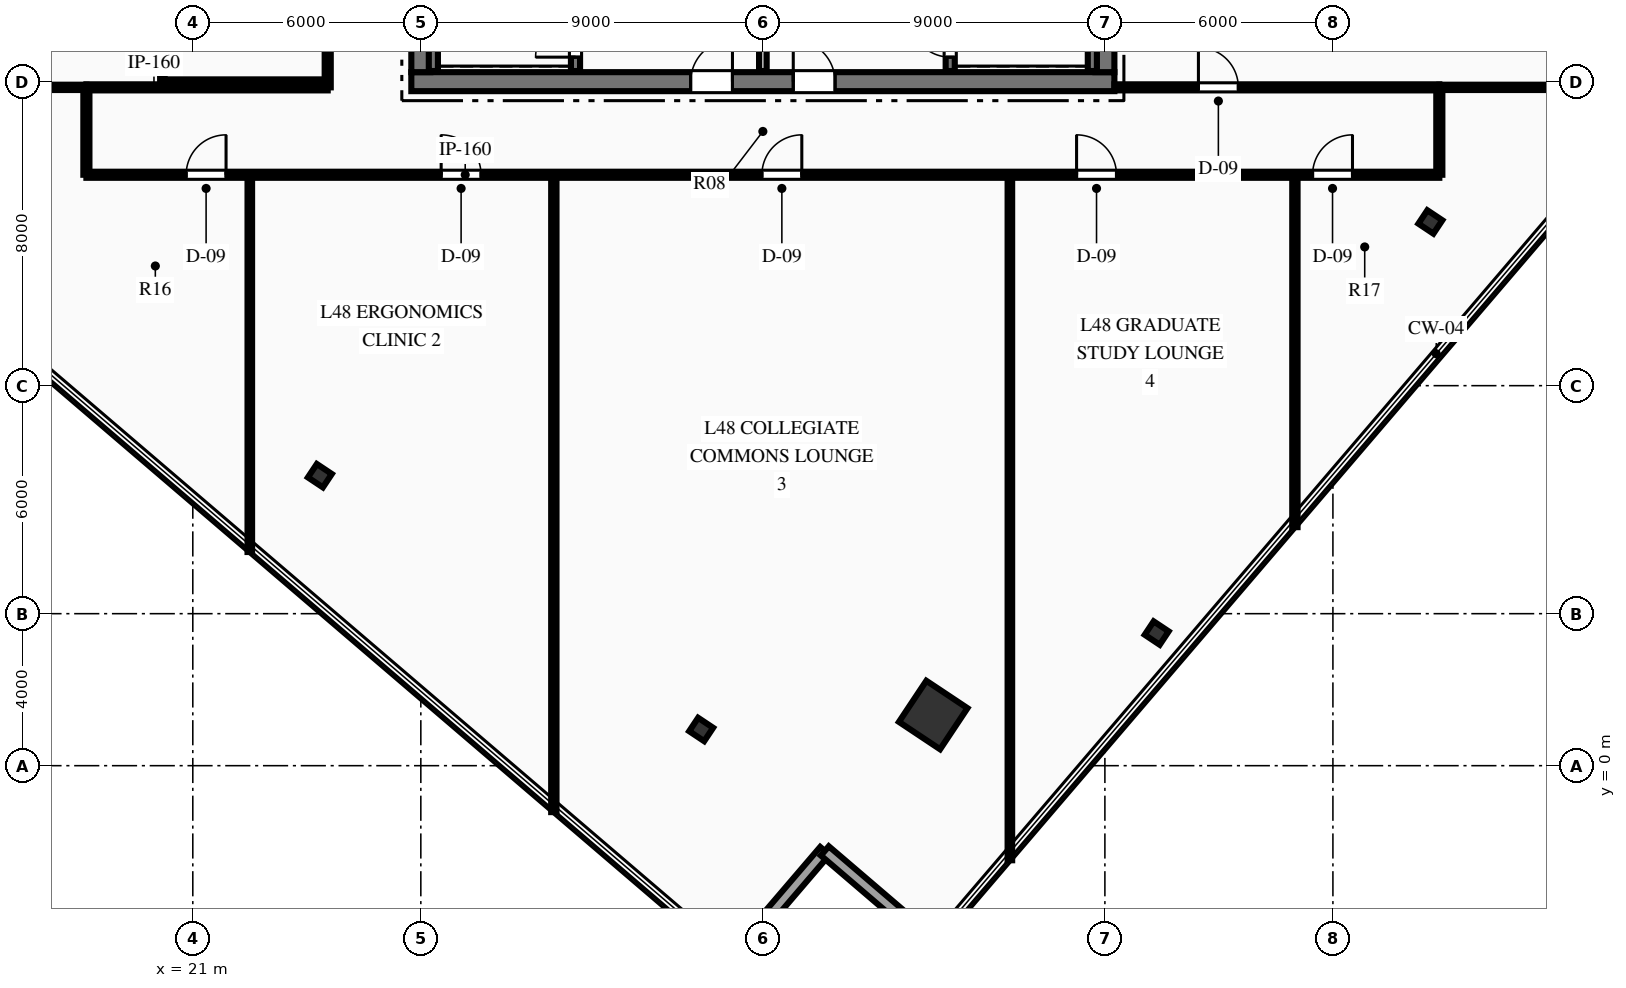
"""IFC4 building model, lengths in metres.
Left out: names, types, materials, properties, quantities, classifications, styles, units other than length and angle.
Written with IfcOpenShell. Run it as: python <this file> out.ifc"""

import sys

from ifc_helpers import new_model, si_unit, direction, frame, frame_2d, origin, origin_2d, place, context, subcontext, project, spatial, rectangle, hollow_rectangle, i_section, extrude, element, fill, save


model = new_model("IFC4")
c1 = context("Model", 3, precision=1e-05, world=origin(), true_north=direction((0.0, 1.0)))
c2 = subcontext(c1, "Body", "Model", "MODEL_VIEW")
j1 = project(units=[si_unit("LENGTHUNIT", "METRE"), si_unit("PLANEANGLEUNIT", "RADIAN")], contexts=[c1])
p1 = place(None, origin())
s1 = spatial("IfcSite", under=j1, at=p1, CompositionType="ELEMENT")
p2 = place(p1, origin())
s2 = spatial("IfcBuilding", under=s1, at=p2, CompositionType="ELEMENT")
p3 = place(p2, frame((0.0, 0.0, 193.95)))
s3 = spatial("IfcBuildingStorey", under=s2, at=p3, CompositionType="ELEMENT", Elevation=193.95)
p4 = place(p3, frame((26.75, 18.0, 0.0), z_axis=(0.0, 0.0, 1.0), x_axis=(1.0, 0.0, 0.0)))
e1 = element("IfcWall", 1, at=p4, inside=s3, PredefinedType="SHEAR", context=c2, shape_type="SweptSolid", body=[
    extrude(rectangle(XDim=18.5, YDim=0.5, at=frame_2d((9.25, 0.0))), origin(), (0.0, 0.0, 1.0), 4.5),
])
p5 = place(p4, frame((7.35, 0.0, 0.0)))
e2 = element("IfcOpeningElement", 2, at=p5, cuts=e1, PredefinedType="OPENING", context=c2, shape_type="SweptSolid", body=[
    extrude(rectangle(XDim=1.1, YDim=2.15, at=frame_2d((0.55, 1.075))), frame((0.0, 0.26, 0.0), z_axis=(0.0, -1.0, 0.0), x_axis=(1.0, 0.0, 0.0)), (0.0, 0.0, 1.0), 0.52),
])
p6 = place(p4, frame((10.05, 0.0, 0.0)))
e3 = element("IfcOpeningElement", 3, at=p6, cuts=e1, PredefinedType="OPENING", context=c2, shape_type="SweptSolid", body=[
    extrude(rectangle(XDim=1.1, YDim=2.15, at=frame_2d((0.55, 1.075))), frame((0.0, 0.26, 0.0), z_axis=(0.0, -1.0, 0.0), x_axis=(1.0, 0.0, 0.0)), (0.0, 0.0, 1.0), 0.52),
])
p7 = place(p3, frame((27.0, 18.25, 0.0), z_axis=(0.0, 0.0, 1.0), x_axis=(0.0, 1.0, 0.0)))
e4 = element("IfcWall", 4, at=p7, inside=s3, PredefinedType="SHEAR", context=c2, shape_type="SweptSolid", body=[
    extrude(rectangle(XDim=15.5, YDim=0.5, at=frame_2d((7.75, 0.0))), origin(), (0.0, 0.0, 1.0), 4.5),
])
p8 = place(p7, frame((9.99, 0.0, 0.0)))
e5 = element("IfcOpeningElement", 5, at=p8, cuts=e4, PredefinedType="OPENING", context=c2, shape_type="SweptSolid", body=[
    extrude(rectangle(XDim=1.4, YDim=2.2, at=frame_2d((0.7, 1.1))), frame((0.0, 0.26, 0.0), z_axis=(0.0, -1.0, 0.0), x_axis=(1.0, 0.0, 0.0)), (0.0, 0.0, 1.0), 0.52),
])
p9 = place(p3, frame((45.0, 18.25, 0.0), z_axis=(0.0, 0.0, 1.0), x_axis=(0.0, 1.0, 0.0)))
e6 = element("IfcWall", 6, at=p9, inside=s3, PredefinedType="SHEAR", context=c2, shape_type="SweptSolid", body=[
    extrude(rectangle(XDim=15.5, YDim=0.5, at=frame_2d((7.75, 0.0))), origin(), (0.0, 0.0, 1.0), 4.5),
])
p10 = place(p9, frame((9.99, 0.0, 0.0)))
e7 = element("IfcOpeningElement", 7, at=p10, cuts=e6, PredefinedType="OPENING", context=c2, shape_type="SweptSolid", body=[
    extrude(rectangle(XDim=1.4, YDim=2.2, at=frame_2d((0.7, 1.1))), frame((0.0, 0.26, 0.0), z_axis=(0.0, -1.0, 0.0), x_axis=(1.0, 0.0, 0.0)), (0.0, 0.0, 1.0), 0.52),
])
p11 = place(p3, frame((31.07, 18.28, 0.0), z_axis=(0.0, 0.0, 1.0), x_axis=(0.0, 1.0, 0.0)))
e8 = element("IfcWall", 8, at=p11, inside=s3, PredefinedType="SHEAR", context=c2, shape_type="SweptSolid", body=[
    extrude(rectangle(XDim=8.26, YDim=0.24, at=frame_2d((4.13, 0.0))), origin(), (0.0, 0.0, 1.0), 4.5),
])
p12 = place(p11, frame((0.365, 0.0, 0.0)))
e9 = element("IfcOpeningElement", 9, at=p12, cuts=e8, PredefinedType="OPENING", context=c2, shape_type="SweptSolid", body=[
    extrude(rectangle(XDim=1.05, YDim=2.15, at=frame_2d((0.525, 1.075))), frame((0.0, 0.13, 0.0), z_axis=(0.0, -1.0, 0.0), x_axis=(1.0, 0.0, 0.0)), (0.0, 0.0, 1.0), 0.26),
])
p13 = place(p3, frame((27.33, 18.28, 0.0), z_axis=(0.0, 0.0, 1.0), x_axis=(0.0, 1.0, 0.0)))
e10 = element("IfcWall", 10, at=p13, inside=s3, PredefinedType="SHEAR", context=c2, shape_type="SweptSolid", body=[
    extrude(rectangle(XDim=8.26, YDim=0.24, at=frame_2d((4.13, 0.0))), origin(), (0.0, 0.0, 1.0), 4.5),
])
p14 = place(p3, frame((40.93, 18.28, 0.0), z_axis=(0.0, 0.0, 1.0), x_axis=(0.0, 1.0, 0.0)))
e11 = element("IfcWall", 11, at=p14, inside=s3, PredefinedType="SHEAR", context=c2, shape_type="SweptSolid", body=[
    extrude(rectangle(XDim=8.26, YDim=0.24, at=frame_2d((4.13, 0.0))), origin(), (0.0, 0.0, 1.0), 4.5),
])
p15 = place(p14, frame((0.365, 0.0, 0.0)))
e12 = element("IfcOpeningElement", 12, at=p15, cuts=e11, PredefinedType="OPENING", context=c2, shape_type="SweptSolid", body=[
    extrude(rectangle(XDim=1.05, YDim=2.15, at=frame_2d((0.525, 1.075))), frame((0.0, 0.13, 0.0), z_axis=(0.0, -1.0, 0.0), x_axis=(1.0, 0.0, 0.0)), (0.0, 0.0, 1.0), 0.26),
])
p16 = place(p3, frame((44.67, 18.28, 0.0), z_axis=(0.0, 0.0, 1.0), x_axis=(0.0, 1.0, 0.0)))
e13 = element("IfcWall", 13, at=p16, inside=s3, PredefinedType="SHEAR", context=c2, shape_type="SweptSolid", body=[
    extrude(rectangle(XDim=8.26, YDim=0.24, at=frame_2d((4.13, 0.0))), origin(), (0.0, 0.0, 1.0), 4.5),
])
p17 = place(p3, frame((40.483, 1.333, 0.0), z_axis=(0.0, 0.0, 1.0), x_axis=(0.554118199338, 0.832437998389, 0.0)))
e14 = element("IfcColumn", 14, at=p17, inside=s3, PredefinedType="COLUMN", context=c2, shape_type="SweptSolid", body=[
    extrude(hollow_rectangle(XDim=1.3, YDim=1.3, WallThickness=0.06, at=origin_2d()), origin(), (0.0, 0.0, 1.0), 4.5),
])
for number, where, z_axis, x_axis in (
    (15, (46.363, 3.49, 0.0), (0.0, 0.0, 1.0), (0.554, 0.832, 0.0)),
    (16, (53.564, 14.308, 0.0), (0.0, 0.0, 1.0), (0.554, 0.832, 0.0)),
    (17, (24.343, 7.631, 0.0), (0.0, 0.0, 1.0), (0.554, 0.832, 0.0)),
    (18, (34.377, 0.952, 0.0), (0.0, 0.0, 1.0), (0.554, 0.832, 0.0)),
):
    element("IfcColumn", number, at=place(p3, frame(where, z_axis=z_axis, x_axis=x_axis)), inside=s3, PredefinedType="COLUMN", context=c2, shape_type="SweptSolid", body=[
        extrude(i_section(OverallWidth=0.424, OverallDepth=0.474, WebThickness=0.048, FlangeThickness=0.077, at=origin_2d()), origin(), (0.0, 0.0, 1.0), 4.5),
    ])
for number, where, z_axis, x_axis in (
    (19, (37.631, -2.243, 0.0), (0.0, 0.0, 1.0), (-0.65, -0.76, 0.0)),
    (20, (40.594, -4.778, 0.0), (0.0, 0.0, 1.0), (-0.76, 0.65, 0.0)),
):
    element("IfcWall", number, at=place(p3, frame(where, z_axis=z_axis, x_axis=x_axis)), inside=s3, PredefinedType="STANDARD", context=c2, shape_type="SweptSolid", body=[
        extrude(rectangle(XDim=3.9, YDim=0.32, at=frame_2d((1.95, 0.0))), origin(), (0.0, 0.0, 1.0), 4.22),
    ])
p18 = place(p3, frame((36.0, 18.28, 0.0), z_axis=(0.0, 0.0, 1.0), x_axis=(0.0, 1.0, 0.0)))
e21 = element("IfcWall", 21, at=p18, inside=s3, PredefinedType="PARTITIONING", context=c2, shape_type="SweptSolid", body=[
    extrude(rectangle(XDim=3.77, YDim=0.2, at=frame_2d((1.885, 0.0))), origin(), (0.0, 0.0, 1.0), 4.22),
])
p19 = place(p3, frame((18.2, 15.55, 0.0), z_axis=(0.0, 0.0, 1.0), x_axis=(1.0, 0.0, 0.0)))
e22 = element("IfcWall", 22, at=p19, inside=s3, PredefinedType="PARTITIONING", context=c2, shape_type="SweptSolid", body=[
    extrude(rectangle(XDim=35.6, YDim=0.16, at=frame_2d((17.8, 0.0))), origin(), (0.0, 0.0, 1.0), 3.599),
])
p20 = place(p19, frame((2.625, 0.0, 0.0)))
e23 = element("IfcOpeningElement", 23, at=p20, cuts=e22, PredefinedType="OPENING", context=c2, shape_type="SweptSolid", body=[
    extrude(rectangle(XDim=1.05, YDim=2.15, at=frame_2d((0.525, 1.075))), frame((0.0, 0.09, 0.0), z_axis=(0.0, -1.0, 0.0), x_axis=(1.0, 0.0, 0.0)), (0.0, 0.0, 1.0), 0.18),
])
p21 = place(p19, frame((9.335, 0.0, 0.0)))
e24 = element("IfcOpeningElement", 24, at=p21, cuts=e22, PredefinedType="OPENING", context=c2, shape_type="SweptSolid", body=[
    extrude(rectangle(XDim=1.05, YDim=2.15, at=frame_2d((0.525, 1.075))), frame((0.0, 0.09, 0.0), z_axis=(0.0, -1.0, 0.0), x_axis=(1.0, 0.0, 0.0)), (0.0, 0.0, 1.0), 0.18),
])
p22 = place(p19, frame((17.775, 0.0, 0.0)))
e25 = element("IfcOpeningElement", 25, at=p22, cuts=e22, PredefinedType="OPENING", context=c2, shape_type="SweptSolid", body=[
    extrude(rectangle(XDim=1.05, YDim=2.15, at=frame_2d((0.525, 1.075))), frame((0.0, 0.09, 0.0), z_axis=(0.0, -1.0, 0.0), x_axis=(1.0, 0.0, 0.0)), (0.0, 0.0, 1.0), 0.18),
])
p23 = place(p19, frame((26.055, 0.0, 0.0)))
e26 = element("IfcOpeningElement", 26, at=p23, cuts=e22, PredefinedType="OPENING", context=c2, shape_type="SweptSolid", body=[
    extrude(rectangle(XDim=1.05, YDim=2.15, at=frame_2d((0.525, 1.075))), frame((0.0, 0.09, 0.0), z_axis=(0.0, -1.0, 0.0), x_axis=(1.0, 0.0, 0.0)), (0.0, 0.0, 1.0), 0.18),
])
p24 = place(p19, frame((32.265, 0.0, 0.0)))
e27 = element("IfcOpeningElement", 27, at=p24, cuts=e22, PredefinedType="OPENING", context=c2, shape_type="SweptSolid", body=[
    extrude(rectangle(XDim=1.05, YDim=2.15, at=frame_2d((0.525, 1.075))), frame((0.0, 0.09, 0.0), z_axis=(0.0, -1.0, 0.0), x_axis=(1.0, 0.0, 0.0)), (0.0, 0.0, 1.0), 0.18),
])
p25 = place(p3, frame((18.2, 17.85, 0.0), z_axis=(0.0, 0.0, 1.0), x_axis=(1.0, 0.0, 0.0)))
e28 = element("IfcWall", 28, at=p25, inside=s3, PredefinedType="PARTITIONING", context=c2, shape_type="SweptSolid", body=[
    extrude(rectangle(XDim=6.35, YDim=0.16, at=frame_2d((3.175, 0.0))), origin(), (0.0, 0.0, 1.0), 4.22),
])
p26 = place(p3, frame((45.25, 17.85, 0.0), z_axis=(0.0, 0.0, 1.0), x_axis=(1.0, 0.0, 0.0)))
e29 = element("IfcWall", 29, at=p26, inside=s3, PredefinedType="PARTITIONING", context=c2, shape_type="SweptSolid", body=[
    extrude(rectangle(XDim=8.55, YDim=0.16, at=frame_2d((4.275, 0.0))), origin(), (0.0, 0.0, 1.0), 4.22),
])
p27 = place(p26, frame((2.211, 0.0, 0.0)))
e30 = element("IfcOpeningElement", 30, at=p27, cuts=e29, PredefinedType="OPENING", context=c2, shape_type="SweptSolid", body=[
    extrude(rectangle(XDim=1.05, YDim=2.15, at=frame_2d((0.525, 1.075))), frame((0.0, 0.09, 0.0), z_axis=(0.0, -1.0, 0.0), x_axis=(1.0, 0.0, 0.0)), (0.0, 0.0, 1.0), 0.18),
])
p28 = place(p3, frame((24.55, 17.85, 0.0), z_axis=(0.0, 0.0, 1.0), x_axis=(0.0, 1.0, 0.0)))
e31 = element("IfcWall", 31, at=p28, inside=s3, PredefinedType="PARTITIONING", context=c2, shape_type="SweptSolid", body=[
    extrude(rectangle(XDim=16.3, YDim=0.16, at=frame_2d((8.15, 0.0))), origin(), (0.0, 0.0, 1.0), 4.22),
])
p29 = place(p28, frame((2.775, 0.0, 0.0)))
e32 = element("IfcOpeningElement", 32, at=p29, cuts=e31, PredefinedType="OPENING", context=c2, shape_type="SweptSolid", body=[
    extrude(rectangle(XDim=0.95, YDim=2.15, at=frame_2d((0.475, 1.075))), frame((0.0, 0.09, 0.0), z_axis=(0.0, -1.0, 0.0), x_axis=(1.0, 0.0, 0.0)), (0.0, 0.0, 1.0), 0.18),
])
p30 = place(p28, frame((8.729, 0.0, 0.0)))
e33 = element("IfcOpeningElement", 33, at=p30, cuts=e31, PredefinedType="OPENING", context=c2, shape_type="SweptSolid", body=[
    extrude(rectangle(XDim=1.05, YDim=2.15, at=frame_2d((0.525, 1.075))), frame((0.0, 0.09, 0.0), z_axis=(0.0, -1.0, 0.0), x_axis=(1.0, 0.0, 0.0)), (0.0, 0.0, 1.0), 0.18),
])
for number, where, z_axis, x_axis in (
    (34, (18.2, 15.55, 0.0), (0.0, 0.0, 1.0), (0.0, 1.0, 0.0)),
    (35, (53.8, 15.55, 0.0), (0.0, 0.0, 1.0), (0.0, 1.0, 0.0)),
):
    element("IfcWall", number, at=place(p3, frame(where, z_axis=z_axis, x_axis=x_axis)), inside=s3, PredefinedType="PARTITIONING", context=c2, shape_type="SweptSolid", body=[
        extrude(rectangle(XDim=2.3, YDim=0.16, at=frame_2d((1.15, 0.0))), origin(), (0.0, 0.0, 1.0), 4.22),
    ])
p31 = place(p3, frame((8.209, 17.85, 0.0), z_axis=(0.0, 0.0, 1.0), x_axis=(1.0, 0.0, 0.0)))
e36 = element("IfcWall", 36, at=p31, inside=s3, PredefinedType="PARTITIONING", context=c2, shape_type="SweptSolid", body=[
    extrude(rectangle(XDim=9.991, YDim=0.14, at=frame_2d((4.996, 0.0))), origin(), (0.0, 0.0, 1.0), 4.22),
])
p32 = place(p3, frame((53.8, 17.85, 0.0), z_axis=(0.0, 0.0, 1.0), x_axis=(1.0, 0.0, 0.0)))
e37 = element("IfcWall", 37, at=p32, inside=s3, PredefinedType="PARTITIONING", context=c2, shape_type="SweptSolid", body=[
    extrude(rectangle(XDim=6.102, YDim=0.14, at=frame_2d((3.051, 0.0))), origin(), (0.0, 0.0, 1.0), 4.22),
])
p33 = place(p3, frame((22.5, 5.623, 0.0), z_axis=(0.0, 0.0, 1.0), x_axis=(0.0, 1.0, 0.0)))
e38 = element("IfcWall", 38, at=p33, inside=s3, PredefinedType="PARTITIONING", context=c2, shape_type="SweptSolid", body=[
    extrude(rectangle(XDim=9.927, YDim=0.12, at=frame_2d((4.964, 0.0))), origin(), (0.0, 0.0, 1.0), 4.22),
])
p34 = place(p3, frame((30.5, -1.222, 0.0), z_axis=(0.0, 0.0, 1.0), x_axis=(0.0, 1.0, 0.0)))
e39 = element("IfcWall", 39, at=p34, inside=s3, PredefinedType="PARTITIONING", context=c2, shape_type="SweptSolid", body=[
    extrude(rectangle(XDim=16.772, YDim=0.14, at=frame_2d((8.386, 0.0))), origin(), (0.0, 0.0, 1.0), 4.22),
])
p35 = place(p3, frame((42.5, -2.489, 0.0), z_axis=(0.0, 0.0, 1.0), x_axis=(0.0, 1.0, 0.0)))
e40 = element("IfcWall", 40, at=p35, inside=s3, PredefinedType="PARTITIONING", context=c2, shape_type="SweptSolid", body=[
    extrude(rectangle(XDim=18.039, YDim=0.12, at=frame_2d((9.02, 0.0))), origin(), (0.0, 0.0, 1.0), 4.22),
])
p36 = place(p3, frame((50.0, 6.277, 0.0), z_axis=(0.0, 0.0, 1.0), x_axis=(0.0, 1.0, 0.0)))
e41 = element("IfcWall", 41, at=p36, inside=s3, PredefinedType="PARTITIONING", context=c2, shape_type="SweptSolid", body=[
    extrude(rectangle(XDim=9.273, YDim=0.14, at=frame_2d((4.637, 0.0))), origin(), (0.0, 0.0, 1.0), 4.22),
])
p37 = place(p3, frame((20.2, 18.0, 0.0), z_axis=(0.0, 0.0, 1.0), x_axis=(1.0, 0.0, 0.0)))
e42 = element("IfcWall", 42, at=p37, inside=s3, PredefinedType="PARTITIONING", context=c2, shape_type="SweptSolid", body=[
    extrude(rectangle(XDim=4.35, YDim=0.12, at=frame_2d((2.175, 0.0))), origin(), (0.0, 0.0, 1.0), 4.22),
])
p38 = place(p3, frame((20.2, 18.0, 0.0), z_axis=(0.0, 0.0, 1.0), x_axis=(0.0, 1.0, 0.0)))
e43 = element("IfcWall", 43, at=p38, inside=s3, PredefinedType="PARTITIONING", context=c2, shape_type="SweptSolid", body=[
    extrude(rectangle(XDim=6.2, YDim=0.12, at=frame_2d((3.1, 0.0))), origin(), (0.0, 0.0, 1.0), 4.22),
])
p39 = place(p38, frame((3.825, 0.0, 0.0)))
e44 = element("IfcOpeningElement", 44, at=p39, cuts=e43, PredefinedType="OPENING", context=c2, shape_type="SweptSolid", body=[
    extrude(rectangle(XDim=0.95, YDim=2.15, at=frame_2d((0.475, 1.075))), frame((0.0, 0.07, 0.0), z_axis=(0.0, -1.0, 0.0), x_axis=(1.0, 0.0, 0.0)), (0.0, 0.0, 1.0), 0.14),
])
p40 = place(p12, origin())
e45 = element("IfcDoor", 45, at=p40, inside=s3, OperationType="SINGLE_SWING_LEFT", PredefinedType="DOOR", context=c2, shape_type="SweptSolid", body=[
    extrude(rectangle(XDim=1.05, YDim=2.15, at=frame_2d((0.525, 1.075))), frame((0.0, 0.025, 0.0), z_axis=(0.0, -1.0, 0.0), x_axis=(1.0, 0.0, 0.0)), (0.0, 0.0, 1.0), 0.05),
])
fill(e9, e45)
p41 = place(p15, origin())
e46 = element("IfcDoor", 46, at=p41, inside=s3, OperationType="SINGLE_SWING_RIGHT", PredefinedType="DOOR", context=c2, shape_type="SweptSolid", body=[
    extrude(rectangle(XDim=1.05, YDim=2.15, at=frame_2d((0.525, 1.075))), frame((0.0, 0.025, 0.0), z_axis=(0.0, -1.0, 0.0), x_axis=(1.0, 0.0, 0.0)), (0.0, 0.0, 1.0), 0.05),
])
fill(e12, e46)
p42 = place(p5, origin())
e47 = element("IfcDoor", 47, at=p42, inside=s3, OperationType="SINGLE_SWING_RIGHT", PredefinedType="DOOR", context=c2, shape_type="SweptSolid", body=[
    extrude(rectangle(XDim=1.1, YDim=2.15, at=frame_2d((0.55, 1.075))), frame((0.0, 0.025, 0.0), z_axis=(0.0, -1.0, 0.0), x_axis=(1.0, 0.0, 0.0)), (0.0, 0.0, 1.0), 0.05),
])
fill(e2, e47)
p43 = place(p6, origin())
e48 = element("IfcDoor", 48, at=p43, inside=s3, OperationType="SINGLE_SWING_LEFT", PredefinedType="DOOR", context=c2, shape_type="SweptSolid", body=[
    extrude(rectangle(XDim=1.1, YDim=2.15, at=frame_2d((0.55, 1.075))), frame((0.0, 0.025, 0.0), z_axis=(0.0, -1.0, 0.0), x_axis=(1.0, 0.0, 0.0)), (0.0, 0.0, 1.0), 0.05),
])
fill(e3, e48)
p44 = place(p20, origin())
e49 = element("IfcDoor", 49, at=p44, inside=s3, OperationType="SINGLE_SWING_RIGHT", PredefinedType="DOOR", context=c2, shape_type="SweptSolid", body=[
    extrude(rectangle(XDim=1.05, YDim=2.15, at=frame_2d((0.525, 1.075))), frame((0.0, 0.025, 0.0), z_axis=(0.0, -1.0, 0.0), x_axis=(1.0, 0.0, 0.0)), (0.0, 0.0, 1.0), 0.05),
])
fill(e23, e49)
p45 = place(p21, origin())
e50 = element("IfcDoor", 50, at=p45, inside=s3, OperationType="SINGLE_SWING_LEFT", PredefinedType="DOOR", context=c2, shape_type="SweptSolid", body=[
    extrude(rectangle(XDim=1.05, YDim=2.15, at=frame_2d((0.525, 1.075))), frame((0.0, 0.025, 0.0), z_axis=(0.0, -1.0, 0.0), x_axis=(1.0, 0.0, 0.0)), (0.0, 0.0, 1.0), 0.05),
])
fill(e24, e50)
p46 = place(p22, origin())
e51 = element("IfcDoor", 51, at=p46, inside=s3, OperationType="SINGLE_SWING_RIGHT", PredefinedType="DOOR", context=c2, shape_type="SweptSolid", body=[
    extrude(rectangle(XDim=1.05, YDim=2.15, at=frame_2d((0.525, 1.075))), frame((0.0, 0.025, 0.0), z_axis=(0.0, -1.0, 0.0), x_axis=(1.0, 0.0, 0.0)), (0.0, 0.0, 1.0), 0.05),
])
fill(e25, e51)
p47 = place(p23, origin())
e52 = element("IfcDoor", 52, at=p47, inside=s3, OperationType="SINGLE_SWING_LEFT", PredefinedType="DOOR", context=c2, shape_type="SweptSolid", body=[
    extrude(rectangle(XDim=1.05, YDim=2.15, at=frame_2d((0.525, 1.075))), frame((0.0, 0.025, 0.0), z_axis=(0.0, -1.0, 0.0), x_axis=(1.0, 0.0, 0.0)), (0.0, 0.0, 1.0), 0.05),
])
fill(e26, e52)
p48 = place(p24, origin())
e53 = element("IfcDoor", 53, at=p48, inside=s3, OperationType="SINGLE_SWING_RIGHT", PredefinedType="DOOR", context=c2, shape_type="SweptSolid", body=[
    extrude(rectangle(XDim=1.05, YDim=2.15, at=frame_2d((0.525, 1.075))), frame((0.0, 0.025, 0.0), z_axis=(0.0, -1.0, 0.0), x_axis=(1.0, 0.0, 0.0)), (0.0, 0.0, 1.0), 0.05),
])
fill(e27, e53)
p49 = place(p27, origin())
e54 = element("IfcDoor", 54, at=p49, inside=s3, OperationType="SINGLE_SWING_LEFT", PredefinedType="DOOR", context=c2, shape_type="SweptSolid", body=[
    extrude(rectangle(XDim=1.05, YDim=2.15, at=frame_2d((0.525, 1.075))), frame((0.0, 0.025, 0.0), z_axis=(0.0, -1.0, 0.0), x_axis=(1.0, 0.0, 0.0)), (0.0, 0.0, 1.0), 0.05),
])
fill(e30, e54)
save(model, sys.argv[1])
